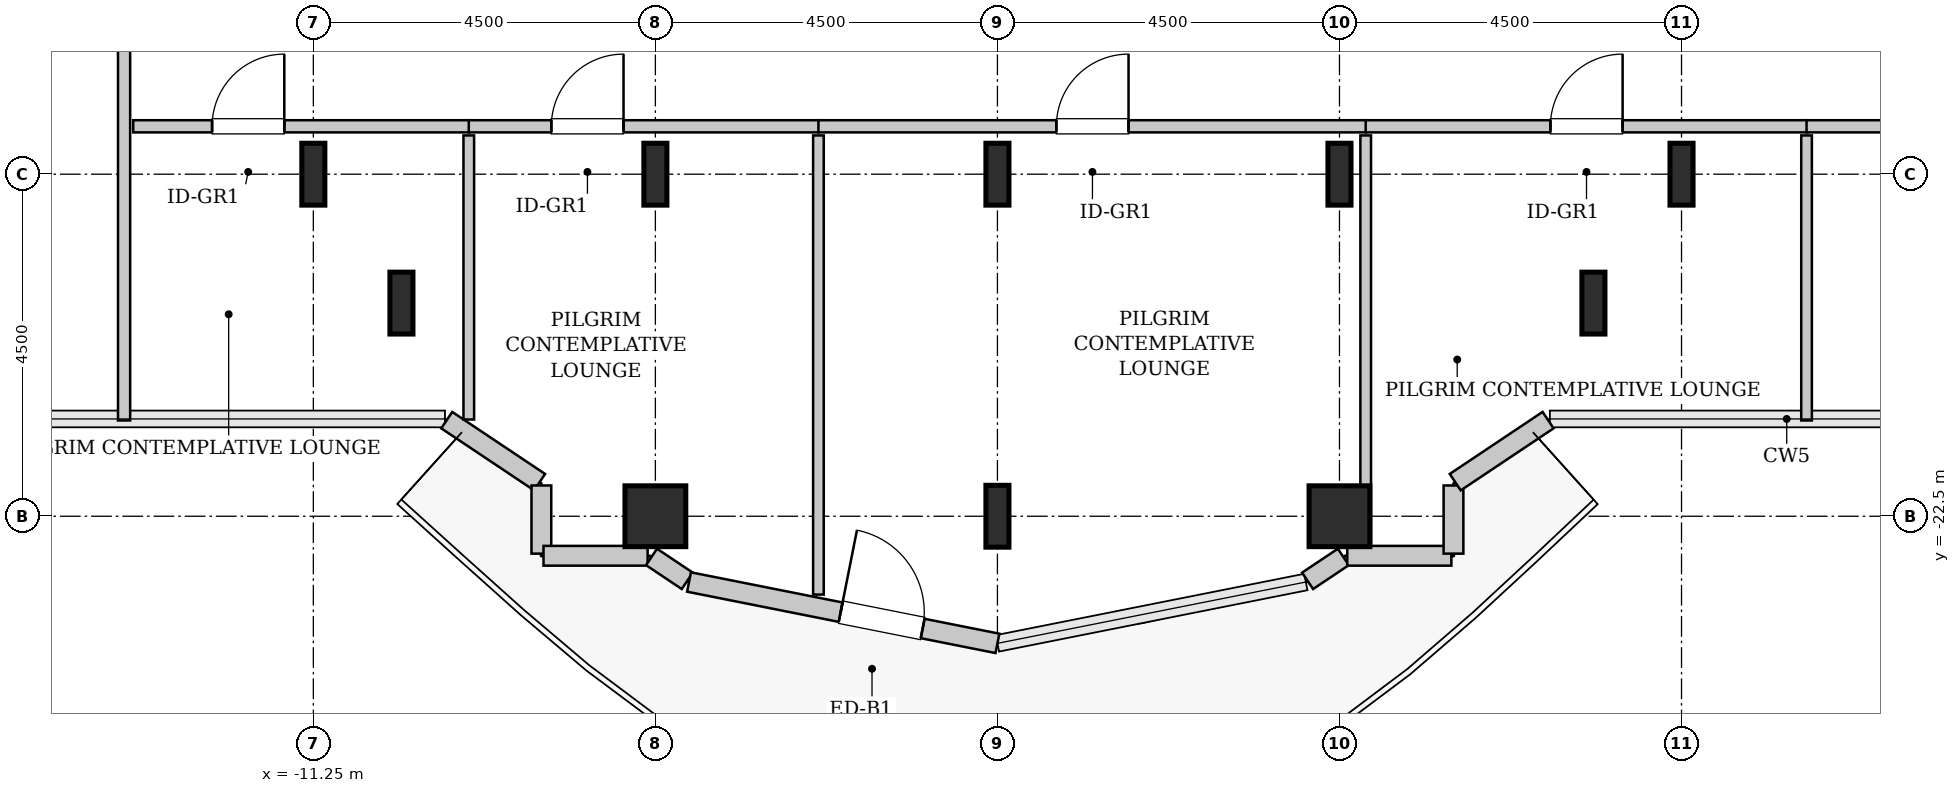
"""IFC4 building model, lengths in metres.
Left out: names, types, materials, properties, quantities, classifications, styles, units other than length and angle.
Written with IfcOpenShell. Run it as: python <this file> out.ifc"""

import sys

from ifc_helpers import new_model, si_unit, direction, frame, frame_2d, origin, origin_2d, place, context, subcontext, project, spatial, rectangle, hollow_rectangle, i_section, extrude, source, transform, mapped, element, fill, save


model = new_model("IFC4")
c1 = context("Model", 3, precision=1e-05, world=origin(), true_north=direction((0.0, 1.0)))
c2 = subcontext(c1, "Body", "Model", "MODEL_VIEW")
j1 = project(units=[si_unit("LENGTHUNIT", "METRE"), si_unit("PLANEANGLEUNIT", "RADIAN")], contexts=[c1])
p1 = place(None, origin())
s1 = spatial("IfcSite", under=j1, at=p1, CompositionType="ELEMENT")
p2 = place(p1, origin())
s2 = spatial("IfcBuilding", under=s1, at=p2, CompositionType="ELEMENT")
p3 = place(p2, frame((0.0, 0.0, 156.4)))
s3 = spatial("IfcBuildingStorey", under=s2, at=p3, CompositionType="ELEMENT", Elevation=156.4)
m1 = source(origin(), c2, "Body", "SweptSolid", [
    extrude(i_section(OverallWidth=0.303, OverallDepth=0.814, WebThickness=0.021, FlangeThickness=0.04, FilletRadius=0.03, at=origin_2d()), origin(), (0.0, 0.0, 1.0), 3.8),
])
for number, where, z_axis, x_axis in (
    (1, (-11.25, -18.0, 0.0), (0.0, 0.0, 1.0), (1.0, 0.0, 0.0)),
    (2, (-10.091, -19.696, 0.0), (0.0, 0.0, 1.0), (1.0, 0.0, 0.0)),
):
    element("IfcColumn", number, at=place(p3, frame(where, z_axis=z_axis, x_axis=x_axis)), inside=s3, PredefinedType="COLUMN", context=c2, shape_type="MappedRepresentation", body=[
        mapped(m1, transform((0.0, 0.0, 0.0), x_axis=(1.0, 0.0, 0.0), y_axis=(0.0, 1.0, 0.0), z_axis=(0.0, 0.0, 1.0), scale=1.0)),
    ])
m2 = source(origin(), c2, "Body", "SweptSolid", [
    extrude(hollow_rectangle(XDim=0.8, YDim=0.8, WallThickness=0.04, InnerFilletRadius=0.04, OuterFilletRadius=0.08, at=origin_2d()), origin(), (0.0, 0.0, 1.0), 3.8),
])
p4 = place(p3, frame((-6.75, -22.5, 0.0), z_axis=(0.0, 0.0, 1.0), x_axis=(1.0, 0.0, 0.0)))
e3 = element("IfcColumn", 3, at=p4, inside=s3, PredefinedType="COLUMN", context=c2, shape_type="MappedRepresentation", body=[
    mapped(m2, transform((0.0, 0.0, 0.0), x_axis=(1.0, 0.0, 0.0), y_axis=(0.0, 1.0, 0.0), z_axis=(0.0, 0.0, 1.0), scale=1.0)),
])
for number, where, z_axis, x_axis in (
    (4, (-6.75, -18.0, 0.0), (0.0, 0.0, 1.0), (1.0, 0.0, 0.0)),
    (5, (-2.25, -22.5, 0.0), (0.0, 0.0, 1.0), (1.0, 0.0, 0.0)),
    (6, (-2.25, -18.0, 0.0), (0.0, 0.0, 1.0), (1.0, 0.0, 0.0)),
):
    element("IfcColumn", number, at=place(p3, frame(where, z_axis=z_axis, x_axis=x_axis)), inside=s3, PredefinedType="COLUMN", context=c2, shape_type="MappedRepresentation", body=[
        mapped(m1, transform((0.0, 0.0, 0.0), x_axis=(1.0, 0.0, 0.0), y_axis=(0.0, 1.0, 0.0), z_axis=(0.0, 0.0, 1.0), scale=1.0)),
    ])
p5 = place(p3, frame((2.25, -22.5, 0.0), z_axis=(0.0, 0.0, 1.0), x_axis=(1.0, 0.0, 0.0)))
e7 = element("IfcColumn", 7, at=p5, inside=s3, PredefinedType="COLUMN", context=c2, shape_type="MappedRepresentation", body=[
    mapped(m2, transform((0.0, 0.0, 0.0), x_axis=(1.0, 0.0, 0.0), y_axis=(0.0, 1.0, 0.0), z_axis=(0.0, 0.0, 1.0), scale=1.0)),
])
for number, where, z_axis, x_axis in (
    (8, (2.25, -18.0, 0.0), (0.0, 0.0, 1.0), (1.0, 0.0, 0.0)),
    (9, (5.591, -19.696, 0.0), (0.0, 0.0, 1.0), (1.0, 0.0, 0.0)),
    (10, (6.75, -18.0, 0.0), (0.0, 0.0, 1.0), (1.0, 0.0, 0.0)),
):
    element("IfcColumn", number, at=place(p3, frame(where, z_axis=z_axis, x_axis=x_axis)), inside=s3, PredefinedType="COLUMN", context=c2, shape_type="MappedRepresentation", body=[
        mapped(m1, transform((0.0, 0.0, 0.0), x_axis=(1.0, 0.0, 0.0), y_axis=(0.0, 1.0, 0.0), z_axis=(0.0, 0.0, 1.0), scale=1.0)),
    ])
m3 = source(origin(), c2, "Body", "SweptSolid", [
    extrude(rectangle(XDim=1.469, YDim=0.26, at=frame_2d((0.734, 0.0))), origin(), (0.0, 0.0, 1.0), 3.55),
])
p6 = place(p3, frame((-9.495, -21.236, 0.0), z_axis=(0.0, 0.0, 1.0), x_axis=(0.831461760506, -0.555581983884, 0.0)))
e11 = element("IfcWall", 11, at=p6, inside=s3, PredefinedType="SOLIDWALL", context=c2, shape_type="MappedRepresentation", body=[
    mapped(m3, transform((0.0, 0.0, 0.0), x_axis=(1.0, 0.0, 0.0), y_axis=(0.0, 1.0, 0.0), z_axis=(0.0, 0.0, 1.0), scale=1.0)),
])
m4 = source(origin(), c2, "Body", "SweptSolid", [
    extrude(rectangle(XDim=0.897, YDim=0.26, at=frame_2d((0.448, 0.0))), origin(), (0.0, 0.0, 1.0), 3.55),
])
p7 = place(p3, frame((-8.25, -22.095, 0.0), z_axis=(0.0, 0.0, 1.0), x_axis=(0.0, -1.0, 0.0)))
e12 = element("IfcWall", 12, at=p7, inside=s3, PredefinedType="SOLIDWALL", context=c2, shape_type="MappedRepresentation", body=[
    mapped(m4, transform((0.0, 0.0, 0.0), x_axis=(1.0, 0.0, 0.0), y_axis=(0.0, 1.0, 0.0), z_axis=(0.0, 0.0, 1.0), scale=1.0)),
])
m5 = source(origin(), c2, "Body", "SweptSolid", [
    extrude(rectangle(XDim=1.37, YDim=0.26, at=frame_2d((0.685, 0.0))), origin(), (0.0, 0.0, 1.0), 3.55),
])
p8 = place(p3, frame((-8.222, -23.02, 0.0), z_axis=(0.0, 0.0, 1.0), x_axis=(1.0, 0.0, 0.0)))
e13 = element("IfcWall", 13, at=p8, inside=s3, PredefinedType="SOLIDWALL", context=c2, shape_type="MappedRepresentation", body=[
    mapped(m5, transform((0.0, 0.0, 0.0), x_axis=(1.0, 0.0, 0.0), y_axis=(0.0, 1.0, 0.0), z_axis=(0.0, 0.0, 1.0), scale=1.0)),
])
m6 = source(origin(), c2, "Body", "SweptSolid", [
    extrude(rectangle(XDim=0.565, YDim=0.26, at=frame_2d((0.283, 0.0))), origin(), (0.0, 0.0, 1.0), 3.55),
])
p9 = place(p3, frame((-6.801, -23.036, 0.0), z_axis=(0.0, 0.0, 1.0), x_axis=(0.831651492666, -0.555297933317, 0.0)))
e14 = element("IfcWall", 14, at=p9, inside=s3, PredefinedType="SOLIDWALL", context=c2, shape_type="MappedRepresentation", body=[
    mapped(m6, transform((0.0, 0.0, 0.0), x_axis=(1.0, 0.0, 0.0), y_axis=(0.0, 1.0, 0.0), z_axis=(0.0, 0.0, 1.0), scale=1.0)),
])
m7 = source(origin(), c2, "Body", "SweptSolid", [
    extrude(rectangle(XDim=4.137, YDim=0.26, at=frame_2d((2.068, 0.0))), origin(), (0.0, 0.0, 1.0), 3.55),
])
p10 = place(p3, frame((-6.307, -23.365, 0.0), z_axis=(0.0, 0.0, 1.0), x_axis=(0.980782170794, -0.195105954428, 0.0)))
e15 = element("IfcWall", 15, at=p10, inside=s3, PredefinedType="SOLIDWALL", context=c2, shape_type="MappedRepresentation", body=[
    mapped(m7, transform((0.0, 0.0, 0.0), x_axis=(1.0, 0.0, 0.0), y_axis=(0.0, 1.0, 0.0), z_axis=(0.0, 0.0, 1.0), scale=1.0)),
])
p11 = place(p10, frame((2.034, 0.0, 0.0)))
e16 = element("IfcOpeningElement", 16, at=p11, cuts=e15, PredefinedType="OPENING", context=c2, shape_type="SweptSolid", body=[
    extrude(rectangle(XDim=1.1, YDim=2.2, at=frame_2d((0.55, 1.1))), frame((0.0, 0.14, 0.0), z_axis=(0.0, -1.0, 0.0), x_axis=(1.0, 0.0, 0.0)), (0.0, 0.0, 1.0), 0.28),
])
p12 = place(p3, frame((1.831, -23.35, 0.0), z_axis=(0.0, 0.0, 1.0), x_axis=(0.831651492666, 0.555297933317, 0.0)))
e17 = element("IfcWall", 17, at=p12, inside=s3, PredefinedType="SOLIDWALL", context=c2, shape_type="MappedRepresentation", body=[
    mapped(m6, transform((0.0, 0.0, 0.0), x_axis=(1.0, 0.0, 0.0), y_axis=(0.0, 1.0, 0.0), z_axis=(0.0, 0.0, 1.0), scale=1.0)),
])
p13 = place(p3, frame((2.352, -23.02, 0.0), z_axis=(0.0, 0.0, 1.0), x_axis=(1.0, 0.0, 0.0)))
e18 = element("IfcWall", 18, at=p13, inside=s3, PredefinedType="SOLIDWALL", context=c2, shape_type="MappedRepresentation", body=[
    mapped(m5, transform((0.0, 0.0, 0.0), x_axis=(1.0, 0.0, 0.0), y_axis=(0.0, 1.0, 0.0), z_axis=(0.0, 0.0, 1.0), scale=1.0)),
])
p14 = place(p3, frame((3.75, -22.992, 0.0), z_axis=(0.0, 0.0, 1.0), x_axis=(0.0, 1.0, 0.0)))
e19 = element("IfcWall", 19, at=p14, inside=s3, PredefinedType="SOLIDWALL", context=c2, shape_type="MappedRepresentation", body=[
    mapped(m4, transform((0.0, 0.0, 0.0), x_axis=(1.0, 0.0, 0.0), y_axis=(0.0, 1.0, 0.0), z_axis=(0.0, 0.0, 1.0), scale=1.0)),
])
p15 = place(p3, frame((3.773, -22.052, 0.0), z_axis=(0.0, 0.0, 1.0), x_axis=(0.831461760506, 0.555581983884, 0.0)))
e20 = element("IfcWall", 20, at=p15, inside=s3, PredefinedType="SOLIDWALL", context=c2, shape_type="MappedRepresentation", body=[
    mapped(m3, transform((0.0, 0.0, 0.0), x_axis=(1.0, 0.0, 0.0), y_axis=(0.0, 1.0, 0.0), z_axis=(0.0, 0.0, 1.0), scale=1.0)),
])
m8 = source(origin(), c2, "Body", "SweptSolid", [
    extrude(rectangle(XDim=13.045, YDim=0.16, at=frame_2d((6.522, 0.0))), origin(), (0.0, 0.0, 1.0), 3.535),
])
p16 = place(p3, frame((-13.74, -21.24, 0.0), z_axis=(0.0, 0.0, 1.0), x_axis=(0.0, 1.0, 0.0)))
e21 = element("IfcWall", 21, at=p16, inside=s3, PredefinedType="PARTITIONING", context=c2, shape_type="MappedRepresentation", body=[
    mapped(m8, transform((0.0, 0.0, 0.0), x_axis=(1.0, 0.0, 0.0), y_axis=(0.0, 1.0, 0.0), z_axis=(0.0, 0.0, 1.0), scale=1.0)),
])
p17 = place(p16, frame((7.962, 0.0, 0.0)))
e22 = element("IfcOpeningElement", 22, at=p17, cuts=e21, PredefinedType="OPENING", context=c2, shape_type="SweptSolid", body=[
    extrude(rectangle(XDim=0.95, YDim=2.1, at=frame_2d((0.475, 1.05))), frame((0.0, 0.09, 0.0), z_axis=(0.0, -1.0, 0.0), x_axis=(1.0, 0.0, 0.0)), (0.0, 0.0, 1.0), 0.18),
])
m9 = source(origin(), c2, "Body", "SweptSolid", [
    extrude(rectangle(XDim=4.425, YDim=0.16, at=frame_2d((2.212, 0.0))), origin(), (0.0, 0.0, 1.0), 3.535),
])
p18 = place(p3, frame((-13.62, -17.37, 0.0), z_axis=(0.0, 0.0, 1.0), x_axis=(1.0, 0.0, 0.0)))
e23 = element("IfcWall", 23, at=p18, inside=s3, PredefinedType="PARTITIONING", context=c2, shape_type="MappedRepresentation", body=[
    mapped(m9, transform((0.0, 0.0, 0.0), x_axis=(1.0, 0.0, 0.0), y_axis=(0.0, 1.0, 0.0), z_axis=(0.0, 0.0, 1.0), scale=1.0)),
])
p19 = place(p18, frame((1.038, 0.0, 0.0)))
e24 = element("IfcOpeningElement", 24, at=p19, cuts=e23, PredefinedType="OPENING", context=c2, shape_type="SweptSolid", body=[
    extrude(rectangle(XDim=0.95, YDim=2.1, at=frame_2d((0.475, 1.05))), frame((0.0, 0.09, 0.0), z_axis=(0.0, -1.0, 0.0), x_axis=(1.0, 0.0, 0.0)), (0.0, 0.0, 1.0), 0.18),
])
m10 = source(origin(), c2, "Body", "SweptSolid", [
    extrude(rectangle(XDim=3.737, YDim=0.14, at=frame_2d((1.869, 0.0))), origin(), (0.0, 0.0, 1.0), 3.535),
])
p20 = place(p3, frame((-9.205, -21.227, 0.0), z_axis=(0.0, 0.0, 1.0), x_axis=(0.0, 1.0, 0.0)))
e25 = element("IfcWall", 25, at=p20, inside=s3, PredefinedType="PARTITIONING", context=c2, shape_type="MappedRepresentation", body=[
    mapped(m10, transform((0.0, 0.0, 0.0), x_axis=(1.0, 0.0, 0.0), y_axis=(0.0, 1.0, 0.0), z_axis=(0.0, 0.0, 1.0), scale=1.0)),
])
m11 = source(origin(), c2, "Body", "SweptSolid", [
    extrude(rectangle(XDim=4.61, YDim=0.16, at=frame_2d((2.305, 0.0))), origin(), (0.0, 0.0, 1.0), 3.535),
])
p21 = place(p3, frame((-9.205, -17.37, 0.0), z_axis=(0.0, 0.0, 1.0), x_axis=(1.0, 0.0, 0.0)))
e26 = element("IfcWall", 26, at=p21, inside=s3, PredefinedType="PARTITIONING", context=c2, shape_type="MappedRepresentation", body=[
    mapped(m11, transform((0.0, 0.0, 0.0), x_axis=(1.0, 0.0, 0.0), y_axis=(0.0, 1.0, 0.0), z_axis=(0.0, 0.0, 1.0), scale=1.0)),
])
p22 = place(p21, frame((1.086, 0.0, 0.0)))
e27 = element("IfcOpeningElement", 27, at=p22, cuts=e26, PredefinedType="OPENING", context=c2, shape_type="SweptSolid", body=[
    extrude(rectangle(XDim=0.95, YDim=2.1, at=frame_2d((0.475, 1.05))), frame((0.0, 0.09, 0.0), z_axis=(0.0, -1.0, 0.0), x_axis=(1.0, 0.0, 0.0)), (0.0, 0.0, 1.0), 0.18),
])
m12 = source(origin(), c2, "Body", "SweptSolid", [
    extrude(rectangle(XDim=6.041, YDim=0.14, at=frame_2d((3.021, 0.0))), origin(), (0.0, 0.0, 1.0), 3.535),
])
p23 = place(p3, frame((-4.605, -23.531, 0.0), z_axis=(0.0, 0.0, 1.0), x_axis=(0.0, 1.0, 0.0)))
e28 = element("IfcWall", 28, at=p23, inside=s3, PredefinedType="PARTITIONING", context=c2, shape_type="MappedRepresentation", body=[
    mapped(m12, transform((0.0, 0.0, 0.0), x_axis=(1.0, 0.0, 0.0), y_axis=(0.0, 1.0, 0.0), z_axis=(0.0, 0.0, 1.0), scale=1.0)),
])
m13 = source(origin(), c2, "Body", "SweptSolid", [
    extrude(rectangle(XDim=7.21, YDim=0.16, at=frame_2d((3.605, 0.0))), origin(), (0.0, 0.0, 1.0), 3.535),
])
p24 = place(p3, frame((-4.605, -17.37, 0.0), z_axis=(0.0, 0.0, 1.0), x_axis=(1.0, 0.0, 0.0)))
e29 = element("IfcWall", 29, at=p24, inside=s3, PredefinedType="PARTITIONING", context=c2, shape_type="MappedRepresentation", body=[
    mapped(m13, transform((0.0, 0.0, 0.0), x_axis=(1.0, 0.0, 0.0), y_axis=(0.0, 1.0, 0.0), z_axis=(0.0, 0.0, 1.0), scale=1.0)),
])
p25 = place(p24, frame((3.13, 0.0, 0.0)))
e30 = element("IfcOpeningElement", 30, at=p25, cuts=e29, PredefinedType="OPENING", context=c2, shape_type="SweptSolid", body=[
    extrude(rectangle(XDim=0.95, YDim=2.1, at=frame_2d((0.475, 1.05))), frame((0.0, 0.09, 0.0), z_axis=(0.0, -1.0, 0.0), x_axis=(1.0, 0.0, 0.0)), (0.0, 0.0, 1.0), 0.18),
])
m14 = source(origin(), c2, "Body", "SweptSolid", [
    extrude(rectangle(XDim=5.36, YDim=0.14, at=frame_2d((2.68, 0.0))), origin(), (0.0, 0.0, 1.0), 2.875),
])
p26 = place(p3, frame((2.595, -22.85, 0.0), z_axis=(0.0, 0.0, 1.0), x_axis=(0.0, 1.0, 0.0)))
e31 = element("IfcWall", 31, at=p26, inside=s3, PredefinedType="PARTITIONING", context=c2, shape_type="MappedRepresentation", body=[
    mapped(m14, transform((0.0, 0.0, 0.0), x_axis=(1.0, 0.0, 0.0), y_axis=(0.0, 1.0, 0.0), z_axis=(0.0, 0.0, 1.0), scale=1.0)),
])
m15 = source(origin(), c2, "Body", "SweptSolid", [
    extrude(rectangle(XDim=5.81, YDim=0.16, at=frame_2d((2.905, 0.0))), origin(), (0.0, 0.0, 1.0), 3.535),
])
p27 = place(p3, frame((2.595, -17.37, 0.0), z_axis=(0.0, 0.0, 1.0), x_axis=(1.0, 0.0, 0.0)))
e32 = element("IfcWall", 32, at=p27, inside=s3, PredefinedType="PARTITIONING", context=c2, shape_type="MappedRepresentation", body=[
    mapped(m15, transform((0.0, 0.0, 0.0), x_axis=(1.0, 0.0, 0.0), y_axis=(0.0, 1.0, 0.0), z_axis=(0.0, 0.0, 1.0), scale=1.0)),
])
p28 = place(p27, frame((2.43, 0.0, 0.0)))
e33 = element("IfcOpeningElement", 33, at=p28, cuts=e32, PredefinedType="OPENING", context=c2, shape_type="SweptSolid", body=[
    extrude(rectangle(XDim=0.95, YDim=2.1, at=frame_2d((0.475, 1.05))), frame((0.0, 0.09, 0.0), z_axis=(0.0, -1.0, 0.0), x_axis=(1.0, 0.0, 0.0)), (0.0, 0.0, 1.0), 0.18),
])
m16 = source(origin(), c2, "Body", "SweptSolid", [
    extrude(rectangle(XDim=3.75, YDim=0.14, at=frame_2d((1.875, 0.0))), origin(), (0.0, 0.0, 1.0), 3.535),
])
p29 = place(p3, frame((8.395, -21.24, 0.0), z_axis=(0.0, 0.0, 1.0), x_axis=(0.0, 1.0, 0.0)))
e34 = element("IfcWall", 34, at=p29, inside=s3, PredefinedType="PARTITIONING", context=c2, shape_type="MappedRepresentation", body=[
    mapped(m16, transform((0.0, 0.0, 0.0), x_axis=(1.0, 0.0, 0.0), y_axis=(0.0, 1.0, 0.0), z_axis=(0.0, 0.0, 1.0), scale=1.0)),
])
m17 = source(origin(), c2, "Body", "SweptSolid", [
    extrude(rectangle(XDim=5.225, YDim=0.16, at=frame_2d((2.613, 0.0))), origin(), (0.0, 0.0, 1.0), 3.535),
])
p30 = place(p3, frame((8.395, -17.37, 0.0), z_axis=(0.0, 0.0, 1.0), x_axis=(1.0, 0.0, 0.0)))
e35 = element("IfcWall", 35, at=p30, inside=s3, PredefinedType="PARTITIONING", context=c2, shape_type="MappedRepresentation", body=[
    mapped(m17, transform((0.0, 0.0, 0.0), x_axis=(1.0, 0.0, 0.0), y_axis=(0.0, 1.0, 0.0), z_axis=(0.0, 0.0, 1.0), scale=1.0)),
])
p31 = place(p30, frame((1.543, 0.0, 0.0)))
e36 = element("IfcOpeningElement", 36, at=p31, cuts=e35, PredefinedType="OPENING", context=c2, shape_type="SweptSolid", body=[
    extrude(rectangle(XDim=0.95, YDim=2.1, at=frame_2d((0.475, 1.05))), frame((0.0, 0.09, 0.0), z_axis=(0.0, -1.0, 0.0), x_axis=(1.0, 0.0, 0.0)), (0.0, 0.0, 1.0), 0.18),
])
m18 = source(origin(), c2, "Body", "SweptSolid", [
    extrude(rectangle(XDim=1.1, YDim=2.2, at=frame_2d((0.55, 1.1))), frame((0.0, 0.025, 0.0), z_axis=(0.0, -1.0, 0.0), x_axis=(1.0, 0.0, 0.0)), (0.0, 0.0, 1.0), 0.05),
])
p32 = place(p11, origin())
e37 = element("IfcDoor", 37, at=p32, inside=s3, OperationType="SINGLE_SWING_LEFT", PredefinedType="DOOR", context=c2, shape_type="MappedRepresentation", body=[
    mapped(m18, transform((0.0, 0.0, 0.0), x_axis=(1.0, 0.0, 0.0), y_axis=(0.0, 1.0, 0.0), z_axis=(0.0, 0.0, 1.0), scale=1.0)),
])
fill(e16, e37)
m19 = source(origin(), c2, "Body", "SweptSolid", [
    extrude(rectangle(XDim=0.95, YDim=2.1, at=frame_2d((0.475, 1.05))), frame((0.0, 0.025, 0.0), z_axis=(0.0, -1.0, 0.0), x_axis=(1.0, 0.0, 0.0)), (0.0, 0.0, 1.0), 0.05),
])
p33 = place(p19, origin())
e38 = element("IfcDoor", 38, at=p33, inside=s3, OperationType="SINGLE_SWING_RIGHT", PredefinedType="DOOR", context=c2, shape_type="MappedRepresentation", body=[
    mapped(m19, transform((0.0, 0.0, 0.0), x_axis=(1.0, 0.0, 0.0), y_axis=(0.0, 1.0, 0.0), z_axis=(0.0, 0.0, 1.0), scale=1.0)),
])
fill(e24, e38)
p34 = place(p22, origin())
e39 = element("IfcDoor", 39, at=p34, inside=s3, OperationType="SINGLE_SWING_RIGHT", PredefinedType="DOOR", context=c2, shape_type="MappedRepresentation", body=[
    mapped(m19, transform((0.0, 0.0, 0.0), x_axis=(1.0, 0.0, 0.0), y_axis=(0.0, 1.0, 0.0), z_axis=(0.0, 0.0, 1.0), scale=1.0)),
])
fill(e27, e39)
p35 = place(p25, origin())
e40 = element("IfcDoor", 40, at=p35, inside=s3, OperationType="SINGLE_SWING_RIGHT", PredefinedType="DOOR", context=c2, shape_type="MappedRepresentation", body=[
    mapped(m19, transform((0.0, 0.0, 0.0), x_axis=(1.0, 0.0, 0.0), y_axis=(0.0, 1.0, 0.0), z_axis=(0.0, 0.0, 1.0), scale=1.0)),
])
fill(e30, e40)
p36 = place(p28, origin())
e41 = element("IfcDoor", 41, at=p36, inside=s3, OperationType="SINGLE_SWING_RIGHT", PredefinedType="DOOR", context=c2, shape_type="MappedRepresentation", body=[
    mapped(m19, transform((0.0, 0.0, 0.0), x_axis=(1.0, 0.0, 0.0), y_axis=(0.0, 1.0, 0.0), z_axis=(0.0, 0.0, 1.0), scale=1.0)),
])
fill(e33, e41)
save(model, sys.argv[1])
